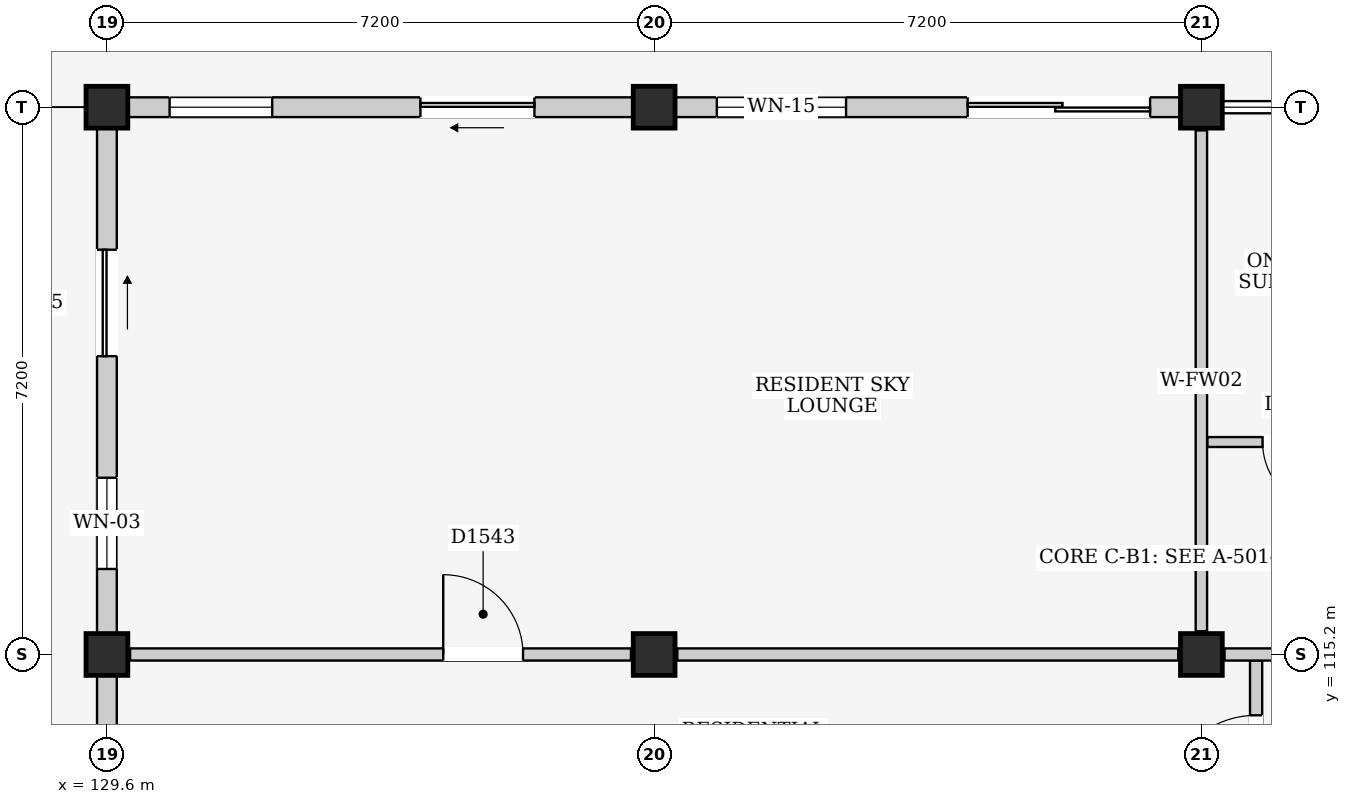
"""IFC4 building model, lengths in metres.
Left out: names, types, materials, properties, quantities, classifications, styles, units other than length and angle.
Written with IfcOpenShell. Run it as: python <this file> out.ifc"""

import sys

from ifc_helpers import new_model, si_unit, direction, frame, frame_2d, origin, origin_2d, place, context, subcontext, project, spatial, rectangle, extrude, element, fill, save


model = new_model("IFC4")
c1 = context("Model", 3, precision=1e-05, world=origin(), true_north=direction((0.0, 1.0)))
c2 = subcontext(c1, "Body", "Model", "MODEL_VIEW")
j1 = project(units=[si_unit("LENGTHUNIT", "METRE"), si_unit("PLANEANGLEUNIT", "RADIAN")], contexts=[c1])
p1 = place(None, origin())
s1 = spatial("IfcSite", under=j1, at=p1, CompositionType="ELEMENT")
p2 = place(p1, origin())
s2 = spatial("IfcBuilding", under=s1, at=p2, CompositionType="ELEMENT")
p3 = place(p2, frame((0.0, 0.0, 25.1)))
s3 = spatial("IfcBuildingStorey", under=s2, at=p3, CompositionType="ELEMENT", Elevation=25.1)
for number, where, z_axis, x_axis in (
    (1, (129.6, 115.2, 0.0), (0.0, 0.0, 1.0), (1.0, 0.0, 0.0)),
    (2, (129.6, 122.4, 0.0), (0.0, 0.0, 1.0), (1.0, 0.0, 0.0)),
    (3, (136.8, 115.2, 0.0), (0.0, 0.0, 1.0), (1.0, 0.0, 0.0)),
    (4, (136.8, 122.4, 0.0), (0.0, 0.0, 1.0), (1.0, 0.0, 0.0)),
    (5, (144.0, 115.2, 0.0), (0.0, 0.0, 1.0), (1.0, 0.0, 0.0)),
    (6, (144.0, 122.4, 0.0), (0.0, 0.0, 1.0), (1.0, 0.0, 0.0)),
):
    element("IfcColumn", number, at=place(p3, frame(where, z_axis=z_axis, x_axis=x_axis)), inside=s3, PredefinedType="COLUMN", context=c2, shape_type="SweptSolid", body=[
        extrude(rectangle(XDim=0.55, YDim=0.55, at=origin_2d()), origin(), (0.0, 0.0, 1.0), 3.2),
    ])
p4 = place(p3, frame((129.6, 108.275, 0.0), z_axis=(0.0, 0.0, 1.0), x_axis=(0.0, 1.0, 0.0)))
e7 = element("IfcWall", 7, at=p4, inside=s3, PredefinedType="ELEMENTEDWALL", context=c2, shape_type="SweptSolid", body=[
    extrude(rectangle(XDim=6.65, YDim=0.26, at=frame_2d((3.325, 0.0))), origin(), (0.0, 0.0, 1.0), 2.475),
])
p5 = place(p4, frame((2.825, 0.0, 1.1)))
e8 = element("IfcOpeningElement", 8, at=p5, cuts=e7, PredefinedType="OPENING", context=c2, shape_type="SweptSolid", body=[
    extrude(rectangle(XDim=1.0, YDim=0.9, at=frame_2d((0.5, 0.45))), frame((0.0, 0.145, 0.0), z_axis=(0.0, -1.0, 0.0), x_axis=(1.0, 0.0, 0.0)), (0.0, 0.0, 1.0), 0.29),
])
p6 = place(p3, frame((129.875, 122.4, 0.0), z_axis=(0.0, 0.0, 1.0), x_axis=(1.0, 0.0, 0.0)))
e9 = element("IfcWall", 9, at=p6, inside=s3, PredefinedType="ELEMENTEDWALL", context=c2, shape_type="SweptSolid", body=[
    extrude(rectangle(XDim=6.65, YDim=0.26, at=frame_2d((3.325, 0.0))), origin(), (0.0, 0.0, 1.0), 2.525),
])
p7 = place(p6, frame((3.85, 0.0, 0.0)))
e10 = element("IfcOpeningElement", 10, at=p7, cuts=e9, PredefinedType="OPENING", context=c2, shape_type="SweptSolid", body=[
    extrude(rectangle(XDim=1.5, YDim=2.12, at=frame_2d((0.75, 1.06))), frame((0.0, 0.145, 0.0), z_axis=(0.0, -1.0, 0.0), x_axis=(1.0, 0.0, 0.0)), (0.0, 0.0, 1.0), 0.29),
])
p8 = place(p6, frame((0.55, 0.0, 0.9)))
e11 = element("IfcOpeningElement", 11, at=p8, cuts=e9, PredefinedType="OPENING", context=c2, shape_type="SweptSolid", body=[
    extrude(rectangle(XDim=1.35, YDim=1.5, at=frame_2d((0.675, 0.75))), frame((0.0, 0.145, 0.0), z_axis=(0.0, -1.0, 0.0), x_axis=(1.0, 0.0, 0.0)), (0.0, 0.0, 1.0), 0.29),
])
p9 = place(p3, frame((129.6, 115.475, 0.0), z_axis=(0.0, 0.0, 1.0), x_axis=(0.0, 1.0, 0.0)))
e12 = element("IfcWall", 12, at=p9, inside=s3, PredefinedType="ELEMENTEDWALL", context=c2, shape_type="SweptSolid", body=[
    extrude(rectangle(XDim=6.65, YDim=0.26, at=frame_2d((3.325, 0.0))), origin(), (0.0, 0.0, 1.0), 2.475),
])
p10 = place(p9, frame((3.65, 0.0, 0.0)))
e13 = element("IfcOpeningElement", 13, at=p10, cuts=e12, PredefinedType="OPENING", context=c2, shape_type="SweptSolid", body=[
    extrude(rectangle(XDim=1.4, YDim=2.1, at=frame_2d((0.7, 1.05))), frame((0.0, 0.145, 0.0), z_axis=(0.0, -1.0, 0.0), x_axis=(1.0, 0.0, 0.0)), (0.0, 0.0, 1.0), 0.29),
])
p11 = place(p9, frame((0.85, 0.0, 0.95)))
e14 = element("IfcOpeningElement", 14, at=p11, cuts=e12, PredefinedType="OPENING", context=c2, shape_type="SweptSolid", body=[
    extrude(rectangle(XDim=1.2, YDim=1.35, at=frame_2d((0.6, 0.675))), frame((0.0, 0.145, 0.0), z_axis=(0.0, -1.0, 0.0), x_axis=(1.0, 0.0, 0.0)), (0.0, 0.0, 1.0), 0.29),
])
p12 = place(p3, frame((137.075, 122.4, 0.0), z_axis=(0.0, 0.0, 1.0), x_axis=(1.0, 0.0, 0.0)))
e15 = element("IfcWall", 15, at=p12, inside=s3, PredefinedType="ELEMENTEDWALL", context=c2, shape_type="SweptSolid", body=[
    extrude(rectangle(XDim=6.65, YDim=0.26, at=frame_2d((3.325, 0.0))), origin(), (0.0, 0.0, 1.0), 2.525),
])
p13 = place(p12, frame((3.85, 0.0, 0.0)))
e16 = element("IfcOpeningElement", 16, at=p13, cuts=e15, PredefinedType="OPENING", context=c2, shape_type="SweptSolid", body=[
    extrude(rectangle(XDim=2.4, YDim=2.12, at=frame_2d((1.2, 1.06))), frame((0.0, 0.145, 0.0), z_axis=(0.0, -1.0, 0.0), x_axis=(1.0, 0.0, 0.0)), (0.0, 0.0, 1.0), 0.29),
])
p14 = place(p12, frame((0.55, 0.0, 0.9)))
e17 = element("IfcOpeningElement", 17, at=p14, cuts=e15, PredefinedType="OPENING", context=c2, shape_type="SweptSolid", body=[
    extrude(rectangle(XDim=1.7, YDim=1.45, at=frame_2d((0.85, 0.725))), frame((0.0, 0.145, 0.0), z_axis=(0.0, -1.0, 0.0), x_axis=(1.0, 0.0, 0.0)), (0.0, 0.0, 1.0), 0.29),
])
p15 = place(p3, frame((144.72, 111.1, 0.0), z_axis=(0.0, 0.0, 1.0), x_axis=(0.0, 1.0, 0.0)))
e18 = element("IfcWall", 18, at=p15, inside=s3, PredefinedType="PARTITIONING", context=c2, shape_type="SweptSolid", body=[
    extrude(rectangle(XDim=4.02, YDim=0.16, at=frame_2d((2.01, 0.0))), origin(), (0.0, 0.0, 1.0), 2.99),
])
p16 = place(p15, frame((2.1, 0.0, 0.0)))
e19 = element("IfcOpeningElement", 19, at=p16, cuts=e18, PredefinedType="OPENING", context=c2, shape_type="SweptSolid", body=[
    extrude(rectangle(XDim=1.2, YDim=2.2, at=frame_2d((0.6, 1.1))), frame((0.0, 0.095, 0.0), z_axis=(0.0, -1.0, 0.0), x_axis=(1.0, 0.0, 0.0)), (0.0, 0.0, 1.0), 0.19),
])
p17 = place(p3, frame((129.905, 115.2, 0.0), z_axis=(0.0, 0.0, 1.0), x_axis=(1.0, 0.0, 0.0)))
e20 = element("IfcWall", 20, at=p17, inside=s3, PredefinedType="PARTITIONING", context=c2, shape_type="SweptSolid", body=[
    extrude(rectangle(XDim=6.59, YDim=0.16, at=frame_2d((3.295, 0.0))), origin(), (0.0, 0.0, 1.0), 2.375),
])
p18 = place(p17, frame((4.12, 0.0, 0.0)))
e21 = element("IfcOpeningElement", 21, at=p18, cuts=e20, PredefinedType="OPENING", context=c2, shape_type="SweptSolid", body=[
    extrude(rectangle(XDim=1.05, YDim=2.2, at=frame_2d((0.525, 1.1))), frame((0.0, 0.095, 0.0), z_axis=(0.0, -1.0, 0.0), x_axis=(1.0, 0.0, 0.0)), (0.0, 0.0, 1.0), 0.19),
])
p19 = place(p3, frame((137.105, 115.2, 0.0), z_axis=(0.0, 0.0, 1.0), x_axis=(1.0, 0.0, 0.0)))
e22 = element("IfcWall", 22, at=p19, inside=s3, PredefinedType="PARTITIONING", context=c2, shape_type="SweptSolid", body=[
    extrude(rectangle(XDim=6.59, YDim=0.16, at=frame_2d((3.295, 0.0))), origin(), (0.0, 0.0, 1.0), 2.375),
])
p20 = place(p3, frame((144.0, 115.505, 0.0), z_axis=(0.0, 0.0, 1.0), x_axis=(0.0, 1.0, 0.0)))
e23 = element("IfcWall", 23, at=p20, inside=s3, PredefinedType="PARTITIONING", context=c2, shape_type="SweptSolid", body=[
    extrude(rectangle(XDim=6.59, YDim=0.15, at=frame_2d((3.295, 0.0))), origin(), (0.0, 0.0, 1.0), 2.475),
])
p21 = place(p3, frame((144.305, 115.2, 0.0), z_axis=(0.0, 0.0, 1.0), x_axis=(1.0, 0.0, 0.0)))
e24 = element("IfcWall", 24, at=p21, inside=s3, PredefinedType="PARTITIONING", context=c2, shape_type="SweptSolid", body=[
    extrude(rectangle(XDim=6.59, YDim=0.16, at=frame_2d((3.295, 0.0))), origin(), (0.0, 0.0, 1.0), 2.375),
])
p22 = place(p21, frame((4.345, 0.0, 0.0)))
e25 = element("IfcOpeningElement", 25, at=p22, cuts=e24, PredefinedType="OPENING", context=c2, shape_type="SweptSolid", body=[
    extrude(rectangle(XDim=1.0, YDim=2.15, at=frame_2d((0.5, 1.075))), frame((0.0, 0.095, 0.0), z_axis=(0.0, -1.0, 0.0), x_axis=(1.0, 0.0, 0.0)), (0.0, 0.0, 1.0), 0.19),
])
p23 = place(p3, frame((144.08, 117.995, 0.0), z_axis=(0.0, 0.0, 1.0), x_axis=(1.0, 0.0, 0.0)))
e26 = element("IfcWall", 26, at=p23, inside=s3, PredefinedType="PARTITIONING", context=c2, shape_type="SweptSolid", body=[
    extrude(rectangle(XDim=2.35, YDim=0.13, at=frame_2d((1.175, 0.0))), origin(), (0.0, 0.0, 1.0), 2.99),
])
p24 = place(p23, frame((0.725, 0.0, 0.0)))
e27 = element("IfcOpeningElement", 27, at=p24, cuts=e26, PredefinedType="OPENING", context=c2, shape_type="SweptSolid", body=[
    extrude(rectangle(XDim=0.9, YDim=2.1, at=frame_2d((0.45, 1.05))), frame((0.0, 0.08, 0.0), z_axis=(0.0, -1.0, 0.0), x_axis=(1.0, 0.0, 0.0)), (0.0, 0.0, 1.0), 0.16),
])
p25 = place(p7, frame((1.5, 0.0, 0.0), z_axis=(0.0, 0.0, 1.0), x_axis=(-1.0, 0.0, 0.0)))
e28 = element("IfcDoor", 28, at=p25, inside=s3, OperationType="SLIDING_TO_LEFT", PredefinedType="DOOR", context=c2, shape_type="SweptSolid", body=[
    extrude(rectangle(XDim=1.5, YDim=2.12, at=frame_2d((0.75, 1.06))), frame((0.0, 0.025, 0.0), z_axis=(0.0, -1.0, 0.0), x_axis=(1.0, 0.0, 0.0)), (0.0, 0.0, 1.0), 0.05),
])
fill(e10, e28)
p26 = place(p8, origin())
e29 = element("IfcWindow", 29, at=p26, inside=s3, PartitioningType="SINGLE_PANEL", PredefinedType="WINDOW", context=c2, shape_type="SweptSolid", body=[
    extrude(rectangle(XDim=1.35, YDim=1.5, at=frame_2d((0.675, 0.75))), frame((0.0, 0.03, 0.0), z_axis=(0.0, -1.0, 0.0), x_axis=(1.0, 0.0, 0.0)), (0.0, 0.0, 1.0), 0.06),
])
fill(e11, e29)
p27 = place(p10, frame((1.4, 0.0, 0.0), z_axis=(0.0, 0.0, 1.0), x_axis=(-1.0, 0.0, 0.0)))
e30 = element("IfcDoor", 30, at=p27, inside=s3, OperationType="SLIDING_TO_RIGHT", PredefinedType="DOOR", context=c2, shape_type="SweptSolid", body=[
    extrude(rectangle(XDim=1.4, YDim=2.1, at=frame_2d((0.7, 1.05))), frame((0.0, 0.025, 0.0), z_axis=(0.0, -1.0, 0.0), x_axis=(1.0, 0.0, 0.0)), (0.0, 0.0, 1.0), 0.05),
])
fill(e13, e30)
p28 = place(p11, origin())
e31 = element("IfcWindow", 31, at=p28, inside=s3, PartitioningType="SINGLE_PANEL", PredefinedType="WINDOW", context=c2, shape_type="SweptSolid", body=[
    extrude(rectangle(XDim=1.2, YDim=1.35, at=frame_2d((0.6, 0.675))), frame((0.0, 0.03, 0.0), z_axis=(0.0, -1.0, 0.0), x_axis=(1.0, 0.0, 0.0)), (0.0, 0.0, 1.0), 0.06),
])
fill(e14, e31)
p29 = place(p13, frame((2.4, 0.0, 0.0), z_axis=(0.0, 0.0, 1.0), x_axis=(-1.0, 0.0, 0.0)))
e32 = element("IfcDoor", 32, at=p29, inside=s3, OperationType="DOUBLE_DOOR_SLIDING", PredefinedType="DOOR", context=c2, shape_type="SweptSolid", body=[
    extrude(rectangle(XDim=2.4, YDim=2.12, at=frame_2d((1.2, 1.06))), frame((0.0, 0.025, 0.0), z_axis=(0.0, -1.0, 0.0), x_axis=(1.0, 0.0, 0.0)), (0.0, 0.0, 1.0), 0.05),
])
fill(e16, e32)
p30 = place(p14, origin())
e33 = element("IfcWindow", 33, at=p30, inside=s3, PartitioningType="DOUBLE_PANEL_VERTICAL", PredefinedType="WINDOW", context=c2, shape_type="SweptSolid", body=[
    extrude(rectangle(XDim=1.7, YDim=1.45, at=frame_2d((0.85, 0.725))), frame((0.0, 0.03, 0.0), z_axis=(0.0, -1.0, 0.0), x_axis=(1.0, 0.0, 0.0)), (0.0, 0.0, 1.0), 0.06),
])
fill(e17, e33)
p31 = place(p16, origin())
e34 = element("IfcDoor", 34, at=p31, inside=s3, OperationType="SINGLE_SWING_LEFT", PredefinedType="DOOR", context=c2, shape_type="SweptSolid", body=[
    extrude(rectangle(XDim=1.2, YDim=2.2, at=frame_2d((0.6, 1.1))), frame((0.0, 0.025, 0.0), z_axis=(0.0, -1.0, 0.0), x_axis=(1.0, 0.0, 0.0)), (0.0, 0.0, 1.0), 0.05),
])
fill(e19, e34)
p32 = place(p18, origin())
e35 = element("IfcDoor", 35, at=p32, inside=s3, OperationType="SINGLE_SWING_LEFT", PredefinedType="DOOR", context=c2, shape_type="SweptSolid", body=[
    extrude(rectangle(XDim=1.05, YDim=2.2, at=frame_2d((0.525, 1.1))), frame((0.0, 0.025, 0.0), z_axis=(0.0, -1.0, 0.0), x_axis=(1.0, 0.0, 0.0)), (0.0, 0.0, 1.0), 0.05),
])
fill(e21, e35)
p33 = place(p24, frame((0.9, 0.0, 0.0), z_axis=(0.0, 0.0, 1.0), x_axis=(-1.0, 0.0, 0.0)))
e36 = element("IfcDoor", 36, at=p33, inside=s3, OperationType="SINGLE_SWING_LEFT", PredefinedType="DOOR", context=c2, shape_type="SweptSolid", body=[
    extrude(rectangle(XDim=0.9, YDim=2.1, at=frame_2d((0.45, 1.05))), frame((0.0, 0.025, 0.0), z_axis=(0.0, -1.0, 0.0), x_axis=(1.0, 0.0, 0.0)), (0.0, 0.0, 1.0), 0.05),
])
fill(e27, e36)
save(model, sys.argv[1])
